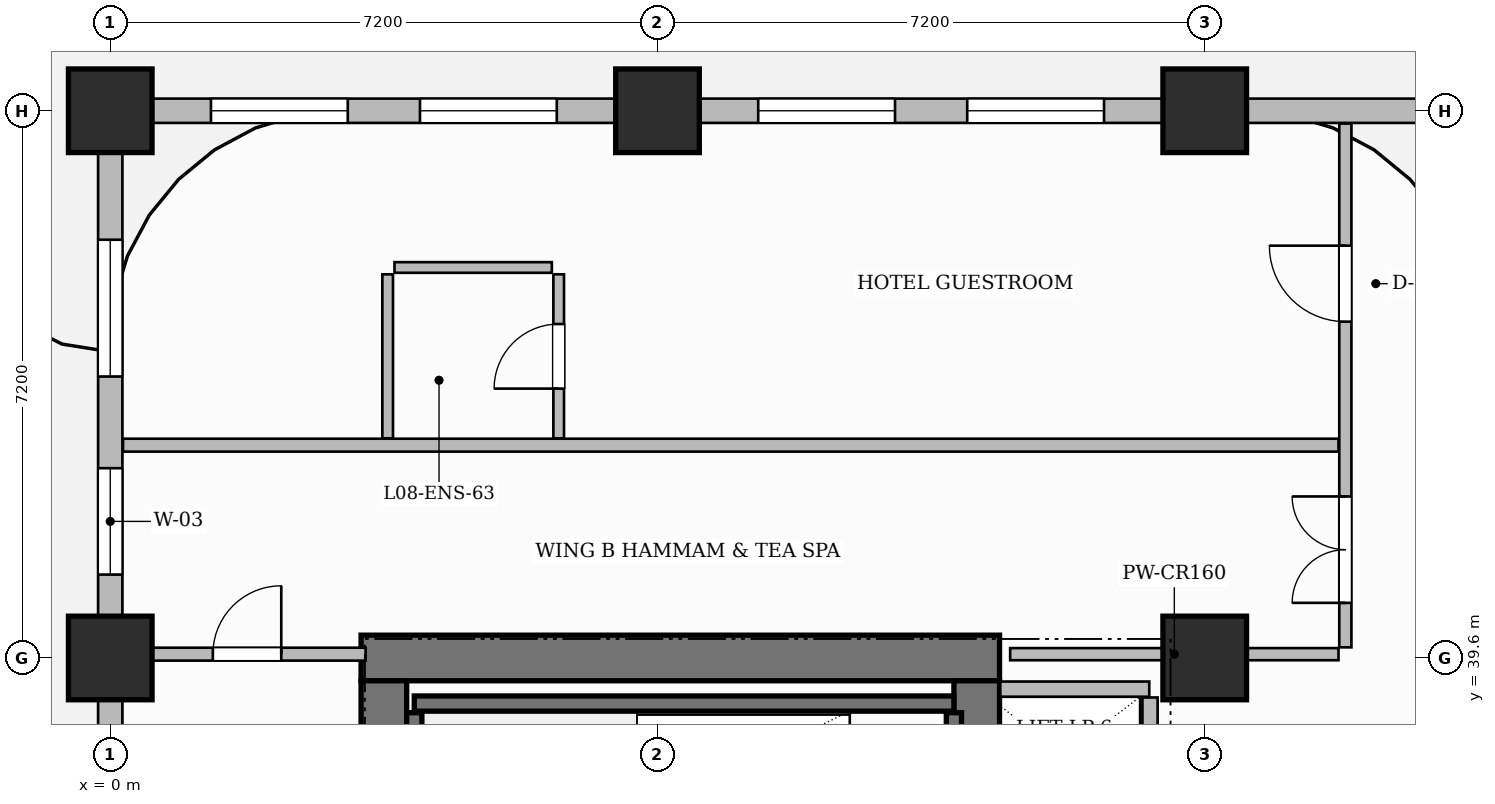
"""IFC4 building model, lengths in metres.
Left out: names, types, materials, properties, quantities, classifications, styles, units other than length and angle.
Written with IfcOpenShell. Run it as: python <this file> out.ifc"""

import sys

from ifc_helpers import new_model, si_unit, direction, frame, frame_2d, origin, origin_2d, place, context, subcontext, project, spatial, rectangle, extrude, source, transform, mapped, element, fill, save


model = new_model("IFC4")
c1 = context("Model", 3, precision=1e-05, world=origin(), true_north=direction((0.0, 1.0)))
c2 = subcontext(c1, "Body", "Model", "MODEL_VIEW")
j1 = project(units=[si_unit("LENGTHUNIT", "METRE"), si_unit("PLANEANGLEUNIT", "RADIAN")], contexts=[c1])
p1 = place(None, origin())
s1 = spatial("IfcSite", under=j1, at=p1, CompositionType="ELEMENT")
p2 = place(p1, origin())
s2 = spatial("IfcBuilding", under=s1, at=p2, CompositionType="ELEMENT")
p3 = place(p2, frame((0.0, 0.0, 39.8)))
s3 = spatial("IfcBuildingStorey", under=s2, at=p3, CompositionType="ELEMENT", Elevation=39.8)
p4 = place(p3, frame((3.3, 39.6, 0.0), z_axis=(0.0, 0.0, 1.0), x_axis=(1.0, 0.0, 0.0)))
e1 = element("IfcWall", 1, at=p4, inside=s3, PredefinedType="SHEAR", context=c2, shape_type="SweptSolid", body=[
    extrude(rectangle(XDim=8.4, YDim=0.6, at=frame_2d((4.2, 0.0))), origin(), (0.0, 0.0, 1.0), 3.7),
])
p5 = place(p3, frame((3.6, 25.5, 0.0), z_axis=(0.0, 0.0, 1.0), x_axis=(0.0, 1.0, 0.0)))
e2 = element("IfcWall", 2, at=p5, inside=s3, PredefinedType="SHEAR", context=c2, shape_type="SweptSolid", body=[
    extrude(rectangle(XDim=13.8, YDim=0.6, at=frame_2d((6.9, 0.0))), origin(), (0.0, 0.0, 1.0), 3.7),
])
p6 = place(p3, frame((11.4, 25.5, 0.0), z_axis=(0.0, 0.0, 1.0), x_axis=(0.0, 1.0, 0.0)))
e3 = element("IfcWall", 3, at=p6, inside=s3, PredefinedType="SHEAR", context=c2, shape_type="SweptSolid", body=[
    extrude(rectangle(XDim=13.8, YDim=0.6, at=frame_2d((6.9, 0.0))), origin(), (0.0, 0.0, 1.0), 3.7),
])
p7 = place(p6, frame((6.47, 0.0, 0.0)))
e4 = element("IfcOpeningElement", 4, at=p7, cuts=e3, PredefinedType="OPENING", context=c2, shape_type="SweptSolid", body=[
    extrude(rectangle(XDim=1.5, YDim=2.2, at=frame_2d((0.75, 1.1))), frame((0.0, 0.31, 0.0), z_axis=(0.0, -1.0, 0.0), x_axis=(1.0, 0.0, 0.0)), (0.0, 0.0, 1.0), 0.62),
])
m1 = source(origin(), c2, "Body", "SweptSolid", [
    extrude(rectangle(XDim=1.1, YDim=1.1, at=origin_2d()), origin(), (0.0, 0.0, 1.0), 3.7),
])
for number, where, z_axis, x_axis in (
    (5, (0.0, 39.6, 0.0), (0.0, 0.0, 1.0), (1.0, 0.0, 0.0)),
    (6, (0.0, 46.8, 0.0), (0.0, 0.0, 1.0), (1.0, 0.0, 0.0)),
    (7, (7.2, 46.8, 0.0), (0.0, 0.0, 1.0), (1.0, 0.0, 0.0)),
    (8, (14.4, 39.6, 0.0), (0.0, 0.0, 1.0), (1.0, 0.0, 0.0)),
    (9, (14.4, 46.8, 0.0), (0.0, 0.0, 1.0), (1.0, 0.0, 0.0)),
):
    element("IfcColumn", number, at=place(p3, frame(where, z_axis=z_axis, x_axis=x_axis)), inside=s3, PredefinedType="COLUMN", context=c2, shape_type="MappedRepresentation", body=[
        mapped(m1, transform((0.0, 0.0, 0.0), scale=1.0)),
    ])
p8 = place(p3, frame((4.0, 39.0, 0.0), z_axis=(0.0, 0.0, 1.0), x_axis=(1.0, 0.0, 0.0)))
e10 = element("IfcWall", 10, at=p8, inside=s3, PredefinedType="SHEAR", context=c2, shape_type="SweptSolid", body=[
    extrude(rectangle(XDim=7.1, YDim=0.2, at=frame_2d((3.55, 0.0))), origin(), (0.0, 0.0, 1.0), 3.7),
])
for number, where, z_axis, x_axis in (
    (11, (4.0, 36.18, 0.0), (0.0, 0.0, 1.0), (0.0, 1.0, 0.0)),
    (12, (11.1, 36.18, 0.0), (0.0, 0.0, 1.0), (0.0, 1.0, 0.0)),
):
    element("IfcWall", number, at=place(p3, frame(where, z_axis=z_axis, x_axis=x_axis)), inside=s3, PredefinedType="SHEAR", context=c2, shape_type="SweptSolid", body=[
        extrude(rectangle(XDim=2.7, YDim=0.2, at=frame_2d((1.35, 0.0))), origin(), (0.0, 0.0, 1.0), 3.7),
    ])
p9 = place(p3, frame((11.71, 39.19, 0.0), z_axis=(0.0, 0.0, 1.0), x_axis=(1.0, 0.0, 0.0)))
e13 = element("IfcWall", 13, at=p9, inside=s3, PredefinedType="PARTITIONING", context=c2, shape_type="SweptSolid", body=[
    extrude(rectangle(XDim=1.96, YDim=0.2, at=frame_2d((0.98, 0.0))), origin(), (0.0, 0.0, 1.0), 3.45),
])
p10 = place(p3, frame((13.68, 34.36, 0.0), z_axis=(0.0, 0.0, 1.0), x_axis=(0.0, 1.0, 0.0)))
e14 = element("IfcWall", 14, at=p10, inside=s3, PredefinedType="PARTITIONING", context=c2, shape_type="SweptSolid", body=[
    extrude(rectangle(XDim=4.72, YDim=0.2, at=frame_2d((2.36, 0.0))), origin(), (0.0, 0.0, 1.0), 3.45),
])
p11 = place(p3, frame((16.25, 39.74, 0.0), z_axis=(0.0, 0.0, 1.0), x_axis=(0.0, 1.0, 0.0)))
e15 = element("IfcWall", 15, at=p11, inside=s3, PredefinedType="PARTITIONING", context=c2, shape_type="SweptSolid", body=[
    extrude(rectangle(XDim=6.892, YDim=0.16, at=frame_2d((3.446, 0.0))), origin(), (0.0, 0.0, 1.0), 3.45),
])
p12 = place(p11, frame((0.585, 0.0, 0.0)))
e16 = element("IfcOpeningElement", 16, at=p12, cuts=e15, PredefinedType="OPENING", context=c2, shape_type="SweptSolid", body=[
    extrude(rectangle(XDim=1.4, YDim=2.35, at=frame_2d((0.7, 1.175))), frame((0.0, 0.09, 0.0), z_axis=(0.0, -1.0, 0.0), x_axis=(1.0, 0.0, 0.0)), (0.0, 0.0, 1.0), 0.18),
])
p13 = place(p11, frame((4.285, 0.0, 0.0)))
e17 = element("IfcOpeningElement", 17, at=p13, cuts=e15, PredefinedType="OPENING", context=c2, shape_type="SweptSolid", body=[
    extrude(rectangle(XDim=1.0, YDim=2.2, at=frame_2d((0.5, 1.1))), frame((0.0, 0.09, 0.0), z_axis=(0.0, -1.0, 0.0), x_axis=(1.0, 0.0, 0.0)), (0.0, 0.0, 1.0), 0.18),
])
p14 = place(p3, frame((11.84, 39.65, 0.0), z_axis=(0.0, 0.0, 1.0), x_axis=(1.0, 0.0, 0.0)))
e18 = element("IfcWall", 18, at=p14, inside=s3, PredefinedType="PARTITIONING", context=c2, shape_type="SweptSolid", body=[
    extrude(rectangle(XDim=4.32, YDim=0.16, at=frame_2d((2.16, 0.0))), origin(), (0.0, 0.0, 1.0), 2.885),
])
p15 = place(p3, frame((0.24, 39.65, 0.0), z_axis=(0.0, 0.0, 1.0), x_axis=(1.0, 0.0, 0.0)))
e19 = element("IfcWall", 19, at=p15, inside=s3, PredefinedType="PARTITIONING", context=c2, shape_type="SweptSolid", body=[
    extrude(rectangle(XDim=3.12, YDim=0.17, at=frame_2d((1.56, 0.0))), origin(), (0.0, 0.0, 1.0), 3.45),
])
p16 = place(p15, frame((1.11, 0.0, 0.0)))
e20 = element("IfcOpeningElement", 20, at=p16, cuts=e19, PredefinedType="OPENING", context=c2, shape_type="SweptSolid", body=[
    extrude(rectangle(XDim=0.9, YDim=2.15, at=frame_2d((0.45, 1.075))), frame((0.0, 0.095, 0.0), z_axis=(0.0, -1.0, 0.0), x_axis=(1.0, 0.0, 0.0)), (0.0, 0.0, 1.0), 0.19),
])
p17 = place(p3, frame((0.168, 42.4, 0.0), z_axis=(0.0, 0.0, 1.0), x_axis=(1.0, 0.0, 0.0)))
e21 = element("IfcWall", 21, at=p17, inside=s3, PredefinedType="PARTITIONING", context=c2, shape_type="SweptSolid", body=[
    extrude(rectangle(XDim=15.992, YDim=0.17, at=frame_2d((7.996, 0.0))), origin(), (0.0, 0.0, 1.0), 3.45),
])
p18 = place(p3, frame((3.65, 42.49, 0.0), z_axis=(0.0, 0.0, 1.0), x_axis=(0.0, 1.0, 0.0)))
e22 = element("IfcWall", 22, at=p18, inside=s3, PredefinedType="PARTITIONING", context=c2, shape_type="SweptSolid", body=[
    extrude(rectangle(XDim=2.158, YDim=0.14, at=frame_2d((1.079, 0.0))), origin(), (0.0, 0.0, 1.0), 3.45),
])
p19 = place(p3, frame((3.74, 44.738, 0.0), z_axis=(0.0, 0.0, 1.0), x_axis=(1.0, 0.0, 0.0)))
e23 = element("IfcWall", 23, at=p19, inside=s3, PredefinedType="PARTITIONING", context=c2, shape_type="SweptSolid", body=[
    extrude(rectangle(XDim=2.07, YDim=0.14, at=frame_2d((1.035, 0.0))), origin(), (0.0, 0.0, 1.0), 3.45),
])
p20 = place(p3, frame((5.9, 42.49, 0.0), z_axis=(0.0, 0.0, 1.0), x_axis=(0.0, 1.0, 0.0)))
e24 = element("IfcWall", 24, at=p20, inside=s3, PredefinedType="PARTITIONING", context=c2, shape_type="SweptSolid", body=[
    extrude(rectangle(XDim=2.158, YDim=0.14, at=frame_2d((1.079, 0.0))), origin(), (0.0, 0.0, 1.0), 3.45),
])
p21 = place(p20, frame((0.654, 0.0, 0.0)))
e25 = element("IfcOpeningElement", 25, at=p21, cuts=e24, PredefinedType="OPENING", context=c2, shape_type="SweptSolid", body=[
    extrude(rectangle(XDim=0.85, YDim=2.1, at=frame_2d((0.425, 1.05))), frame((0.0, 0.08, 0.0), z_axis=(0.0, -1.0, 0.0), x_axis=(1.0, 0.0, 0.0)), (0.0, 0.0, 1.0), 0.16),
])
p22 = place(p3, frame((0.0, 46.8, 0.0), z_axis=(0.0, 0.0, 1.0), x_axis=(1.0, 0.0, 0.0)))
e26 = element("IfcWall", 26, at=p22, inside=s3, PredefinedType="SOLIDWALL", context=c2, shape_type="SweptSolid", body=[
    extrude(rectangle(XDim=18.0, YDim=0.32, at=frame_2d((9.0, 0.0))), origin(), (0.0, 0.0, 1.0), 2.885),
])
p23 = place(p22, frame((1.325, 0.0, 0.8)))
e27 = element("IfcOpeningElement", 27, at=p23, cuts=e26, PredefinedType="OPENING", context=c2, shape_type="SweptSolid", body=[
    extrude(rectangle(XDim=1.8, YDim=1.85, at=frame_2d((0.9, 0.925))), frame((0.0, 0.17, 0.0), z_axis=(0.0, -1.0, 0.0), x_axis=(1.0, 0.0, 0.0)), (0.0, 0.0, 1.0), 0.34),
])
p24 = place(p22, frame((4.075, 0.0, 0.8)))
e28 = element("IfcOpeningElement", 28, at=p24, cuts=e26, PredefinedType="OPENING", context=c2, shape_type="SweptSolid", body=[
    extrude(rectangle(XDim=1.8, YDim=1.85, at=frame_2d((0.9, 0.925))), frame((0.0, 0.17, 0.0), z_axis=(0.0, -1.0, 0.0), x_axis=(1.0, 0.0, 0.0)), (0.0, 0.0, 1.0), 0.34),
])
p25 = place(p22, frame((8.525, 0.0, 0.8)))
e29 = element("IfcOpeningElement", 29, at=p25, cuts=e26, PredefinedType="OPENING", context=c2, shape_type="SweptSolid", body=[
    extrude(rectangle(XDim=1.8, YDim=1.85, at=frame_2d((0.9, 0.925))), frame((0.0, 0.17, 0.0), z_axis=(0.0, -1.0, 0.0), x_axis=(1.0, 0.0, 0.0)), (0.0, 0.0, 1.0), 0.34),
])
p26 = place(p22, frame((11.275, 0.0, 0.8)))
e30 = element("IfcOpeningElement", 30, at=p26, cuts=e26, PredefinedType="OPENING", context=c2, shape_type="SweptSolid", body=[
    extrude(rectangle(XDim=1.8, YDim=1.85, at=frame_2d((0.9, 0.925))), frame((0.0, 0.17, 0.0), z_axis=(0.0, -1.0, 0.0), x_axis=(1.0, 0.0, 0.0)), (0.0, 0.0, 1.0), 0.34),
])
p27 = place(p3, frame((0.0, 25.25, 0.0), z_axis=(0.0, 0.0, 1.0), x_axis=(0.0, 1.0, 0.0)))
e31 = element("IfcWall", 31, at=p27, inside=s3, PredefinedType="SOLIDWALL", context=c2, shape_type="SweptSolid", body=[
    extrude(rectangle(XDim=21.5, YDim=0.32, at=frame_2d((10.75, 0.0))), origin(), (0.0, 0.0, 1.0), 2.885),
])
p28 = place(p27, frame((1.275, 0.0, 0.8)))
e32 = element("IfcOpeningElement", 32, at=p28, cuts=e31, PredefinedType="OPENING", context=c2, shape_type="SweptSolid", body=[
    extrude(rectangle(XDim=1.8, YDim=1.85, at=frame_2d((0.9, 0.925))), frame((0.0, 0.17, 0.0), z_axis=(0.0, -1.0, 0.0), x_axis=(1.0, 0.0, 0.0)), (0.0, 0.0, 1.0), 0.34),
])
p29 = place(p27, frame((4.025, 0.0, 0.8)))
e33 = element("IfcOpeningElement", 33, at=p29, cuts=e31, PredefinedType="OPENING", context=c2, shape_type="SweptSolid", body=[
    extrude(rectangle(XDim=1.8, YDim=1.85, at=frame_2d((0.9, 0.925))), frame((0.0, 0.17, 0.0), z_axis=(0.0, -1.0, 0.0), x_axis=(1.0, 0.0, 0.0)), (0.0, 0.0, 1.0), 0.34),
])
p30 = place(p27, frame((8.475, 0.0, 0.8)))
e34 = element("IfcOpeningElement", 34, at=p30, cuts=e31, PredefinedType="OPENING", context=c2, shape_type="SweptSolid", body=[
    extrude(rectangle(XDim=1.8, YDim=1.85, at=frame_2d((0.9, 0.925))), frame((0.0, 0.17, 0.0), z_axis=(0.0, -1.0, 0.0), x_axis=(1.0, 0.0, 0.0)), (0.0, 0.0, 1.0), 0.34),
])
p31 = place(p27, frame((11.225, 0.0, 0.8)))
e35 = element("IfcOpeningElement", 35, at=p31, cuts=e31, PredefinedType="OPENING", context=c2, shape_type="SweptSolid", body=[
    extrude(rectangle(XDim=1.8, YDim=1.85, at=frame_2d((0.9, 0.925))), frame((0.0, 0.17, 0.0), z_axis=(0.0, -1.0, 0.0), x_axis=(1.0, 0.0, 0.0)), (0.0, 0.0, 1.0), 0.34),
])
p32 = place(p27, frame((15.447, 0.0, 0.8)))
e36 = element("IfcOpeningElement", 36, at=p32, cuts=e31, PredefinedType="OPENING", context=c2, shape_type="SweptSolid", body=[
    extrude(rectangle(XDim=1.4, YDim=1.85, at=frame_2d((0.7, 0.925))), frame((0.0, 0.17, 0.0), z_axis=(0.0, -1.0, 0.0), x_axis=(1.0, 0.0, 0.0)), (0.0, 0.0, 1.0), 0.34),
])
p33 = place(p27, frame((18.053, 0.0, 0.8)))
e37 = element("IfcOpeningElement", 37, at=p33, cuts=e31, PredefinedType="OPENING", context=c2, shape_type="SweptSolid", body=[
    extrude(rectangle(XDim=1.8, YDim=1.85, at=frame_2d((0.9, 0.925))), frame((0.0, 0.17, 0.0), z_axis=(0.0, -1.0, 0.0), x_axis=(1.0, 0.0, 0.0)), (0.0, 0.0, 1.0), 0.34),
])
m2 = source(origin(), c2, "Body", "SweptSolid", [
    extrude(rectangle(XDim=0.9, YDim=2.15, at=frame_2d((0.45, 1.075))), frame((0.0, 0.025, 0.0), z_axis=(0.0, -1.0, 0.0), x_axis=(1.0, 0.0, 0.0)), (0.0, 0.0, 1.0), 0.05),
])
p34 = place(p16, origin())
e38 = element("IfcDoor", 38, at=p34, inside=s3, OperationType="SINGLE_SWING_RIGHT", PredefinedType="DOOR", context=c2, shape_type="MappedRepresentation", body=[
    mapped(m2, transform((0.0, 0.0, 0.0), scale=1.0)),
])
fill(e20, e38)
m3 = source(origin(), c2, "Body", "SweptSolid", [
    extrude(rectangle(XDim=1.4, YDim=2.35, at=frame_2d((0.7, 1.175))), frame((0.0, 0.025, 0.0), z_axis=(0.0, -1.0, 0.0), x_axis=(1.0, 0.0, 0.0)), (0.0, 0.0, 1.0), 0.05),
])
p35 = place(p12, origin())
e39 = element("IfcDoor", 39, at=p35, inside=s3, OperationType="DOUBLE_DOOR_SINGLE_SWING", PredefinedType="DOOR", context=c2, shape_type="MappedRepresentation", body=[
    mapped(m3, transform((0.0, 0.0, 0.0), scale=1.0)),
])
fill(e16, e39)
m4 = source(origin(), c2, "Body", "SweptSolid", [
    extrude(rectangle(XDim=0.85, YDim=2.1, at=frame_2d((0.425, 1.05))), frame((0.0, 0.025, 0.0), z_axis=(0.0, -1.0, 0.0), x_axis=(1.0, 0.0, 0.0)), (0.0, 0.0, 1.0), 0.05),
])
p36 = place(p21, origin())
e40 = element("IfcDoor", 40, at=p36, inside=s3, OperationType="SINGLE_SWING_LEFT", PredefinedType="DOOR", context=c2, shape_type="MappedRepresentation", body=[
    mapped(m4, transform((0.0, 0.0, 0.0), scale=1.0)),
])
fill(e25, e40)
m5 = source(origin(), c2, "Body", "SweptSolid", [
    extrude(rectangle(XDim=1.0, YDim=2.2, at=frame_2d((0.5, 1.1))), frame((0.0, 0.025, 0.0), z_axis=(0.0, -1.0, 0.0), x_axis=(1.0, 0.0, 0.0)), (0.0, 0.0, 1.0), 0.05),
])
p37 = place(p13, origin())
e41 = element("IfcDoor", 41, at=p37, inside=s3, OperationType="SINGLE_SWING_RIGHT", PredefinedType="DOOR", context=c2, shape_type="MappedRepresentation", body=[
    mapped(m5, transform((0.0, 0.0, 0.0), scale=1.0)),
])
fill(e17, e41)
m6 = source(origin(), c2, "Body", "SweptSolid", [
    extrude(rectangle(XDim=1.8, YDim=1.85, at=frame_2d((0.9, 0.925))), frame((0.0, 0.03, 0.0), z_axis=(0.0, -1.0, 0.0), x_axis=(1.0, 0.0, 0.0)), (0.0, 0.0, 1.0), 0.06),
])
p38 = place(p23, origin())
e42 = element("IfcWindow", 42, at=p38, inside=s3, PartitioningType="DOUBLE_PANEL_VERTICAL", PredefinedType="WINDOW", context=c2, shape_type="MappedRepresentation", body=[
    mapped(m6, transform((0.0, 0.0, 0.0), scale=1.0)),
])
fill(e27, e42)
p39 = place(p24, origin())
e43 = element("IfcWindow", 43, at=p39, inside=s3, PartitioningType="DOUBLE_PANEL_VERTICAL", PredefinedType="WINDOW", context=c2, shape_type="MappedRepresentation", body=[
    mapped(m6, transform((0.0, 0.0, 0.0), scale=1.0)),
])
fill(e28, e43)
p40 = place(p25, origin())
e44 = element("IfcWindow", 44, at=p40, inside=s3, PartitioningType="DOUBLE_PANEL_VERTICAL", PredefinedType="WINDOW", context=c2, shape_type="MappedRepresentation", body=[
    mapped(m6, transform((0.0, 0.0, 0.0), scale=1.0)),
])
fill(e29, e44)
p41 = place(p26, origin())
e45 = element("IfcWindow", 45, at=p41, inside=s3, PartitioningType="DOUBLE_PANEL_VERTICAL", PredefinedType="WINDOW", context=c2, shape_type="MappedRepresentation", body=[
    mapped(m6, transform((0.0, 0.0, 0.0), scale=1.0)),
])
fill(e30, e45)
m7 = source(origin(), c2, "Body", "SweptSolid", [
    extrude(rectangle(XDim=1.4, YDim=1.85, at=frame_2d((0.7, 0.925))), frame((0.0, 0.03, 0.0), z_axis=(0.0, -1.0, 0.0), x_axis=(1.0, 0.0, 0.0)), (0.0, 0.0, 1.0), 0.06),
])
p42 = place(p32, origin())
e46 = element("IfcWindow", 46, at=p42, inside=s3, PartitioningType="SINGLE_PANEL", PredefinedType="WINDOW", context=c2, shape_type="MappedRepresentation", body=[
    mapped(m7, transform((0.0, 0.0, 0.0), scale=1.0)),
])
fill(e36, e46)
p43 = place(p33, origin())
e47 = element("IfcWindow", 47, at=p43, inside=s3, PartitioningType="DOUBLE_PANEL_VERTICAL", PredefinedType="WINDOW", context=c2, shape_type="MappedRepresentation", body=[
    mapped(m6, transform((0.0, 0.0, 0.0), scale=1.0)),
])
fill(e37, e47)
save(model, sys.argv[1])
